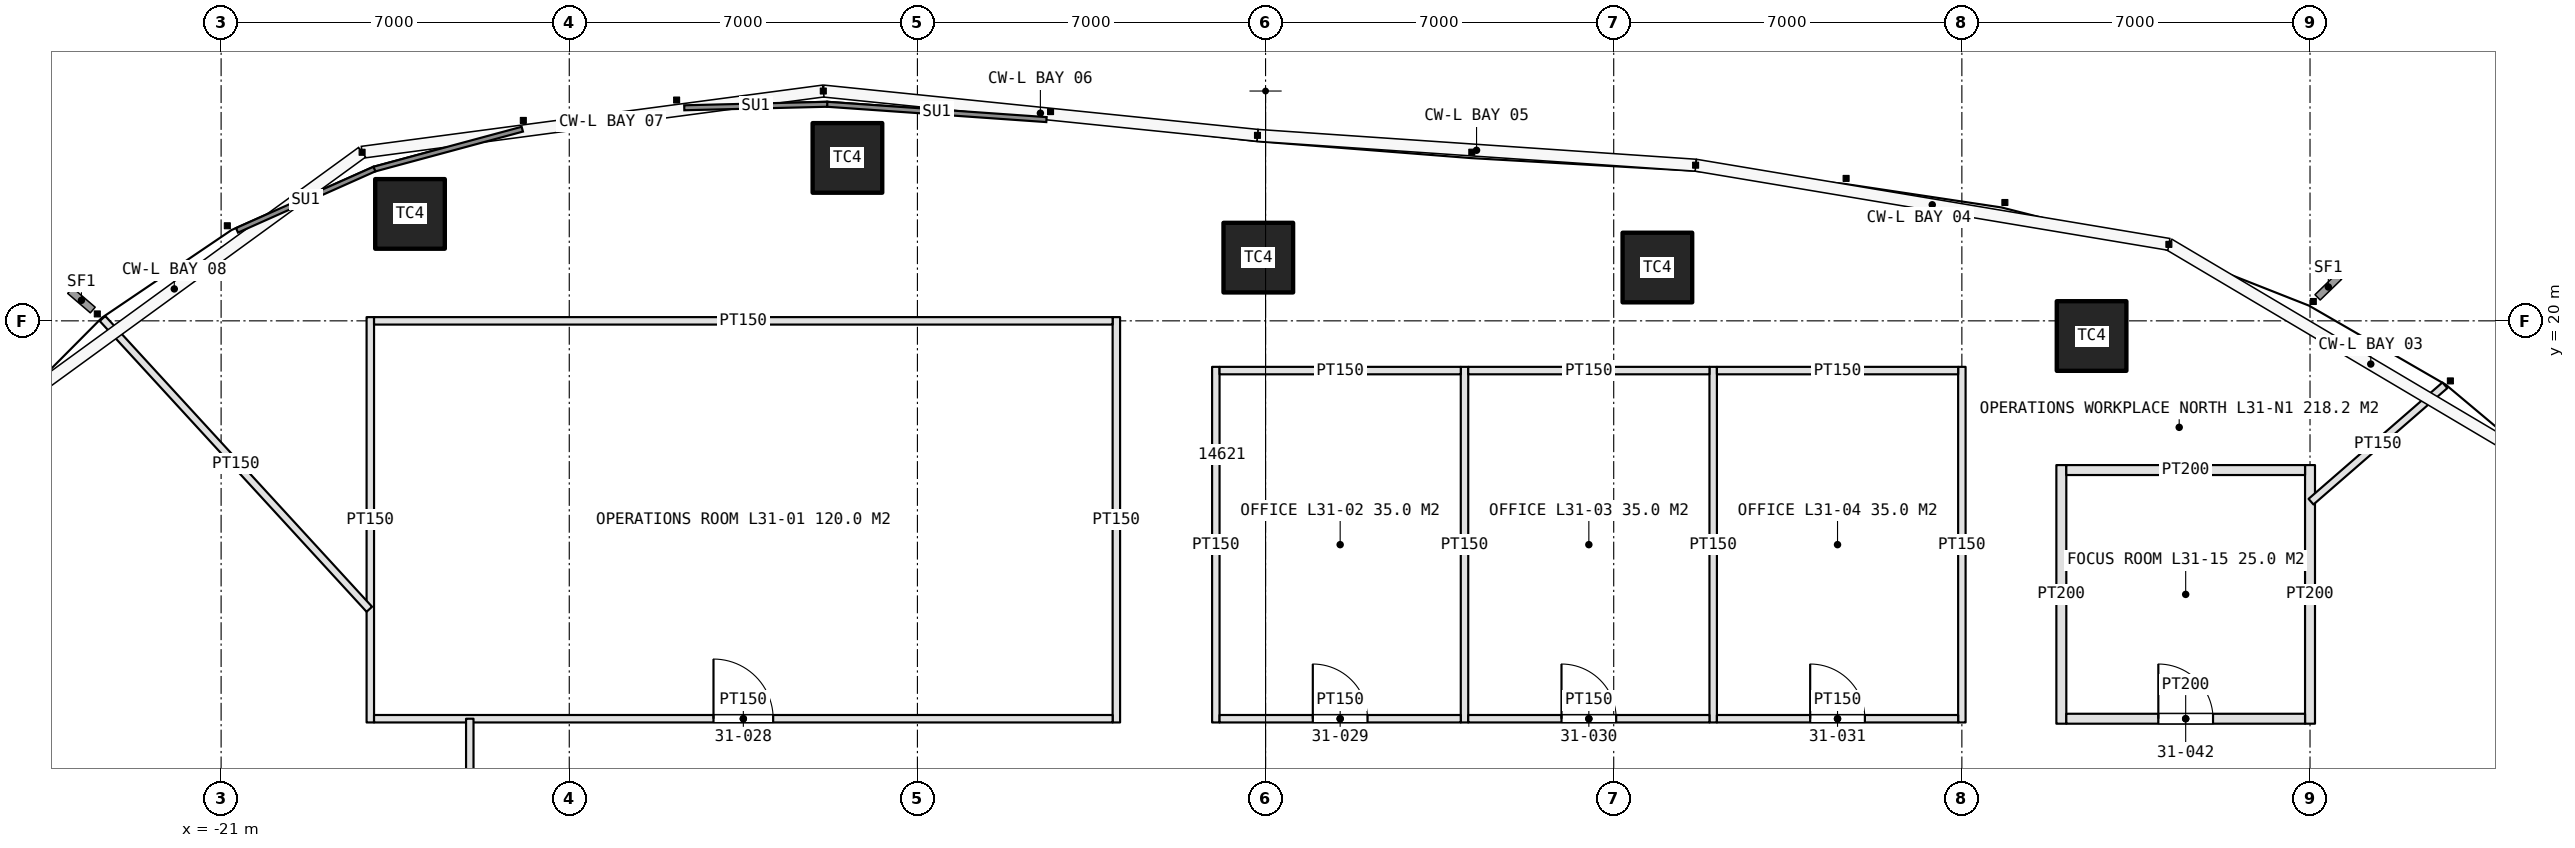
"""IFC4 building model, lengths in metres.
Left out: names, types, materials, properties, quantities, classifications, styles, units other than length and angle.
Written with IfcOpenShell. Run it as: python <this file> out.ifc"""

import sys

from ifc_helpers import new_model, si_unit, direction, frame, frame_2d, origin, origin_2d, place, context, subcontext, project, spatial, rectangle, extrude, element, fill, save


model = new_model("IFC4")
c1 = context("Model", 3, precision=1e-05, world=origin(), true_north=direction((0.0, 1.0)))
c2 = subcontext(c1, "Body", "Model", "MODEL_VIEW")
j1 = project(units=[si_unit("LENGTHUNIT", "METRE"), si_unit("PLANEANGLEUNIT", "RADIAN")], contexts=[c1])
p1 = place(None, origin())
s1 = spatial("IfcSite", under=j1, at=p1, CompositionType="ELEMENT")
p2 = place(p1, origin())
s2 = spatial("IfcBuilding", under=s1, at=p2, CompositionType="ELEMENT")
p3 = place(p2, frame((0.0, 0.0, 147.0)))
s3 = spatial("IfcBuildingStorey", under=s2, at=p3, CompositionType="ELEMENT", Elevation=147.0)
for number, where, z_axis, x_axis in (
    (1, (16.608, 19.695, 0.0), (0.0, 0.0, 1.0), (1.0, 0.0, 0.0)),
    (2, (7.878, 21.072, 0.0), (0.0, 0.0, 1.0), (1.0, 0.0, 0.0)),
    (3, (-0.146, 21.271, 0.0), (0.0, 0.0, 1.0), (1.0, 0.0, 0.0)),
    (4, (-8.407, 23.276, 0.0), (0.0, 0.0, 1.0), (1.0, 0.0, 0.0)),
    (5, (-17.202, 22.15, 0.0), (0.0, 0.0, 1.0), (1.0, 0.0, 0.0)),
):
    element("IfcColumn", number, at=place(p3, frame(where, z_axis=z_axis, x_axis=x_axis)), inside=s3, PredefinedType="COLUMN", context=c2, shape_type="SweptSolid", body=[
        extrude(rectangle(XDim=1.4, YDim=1.4, at=origin_2d()), origin(), (0.0, 0.0, 1.0), 4.2),
    ])
for number, where, z_axis, x_axis in (
    (6, (-18.0, 11.925, 0.0), (0.0, 0.0, 1.0), (0.0, 1.0, 0.0)),
    (7, (-3.0, 11.925, 0.0), (0.0, 0.0, 1.0), (0.0, 1.0, 0.0)),
):
    element("IfcWall", number, at=place(p3, frame(where, z_axis=z_axis, x_axis=x_axis)), inside=s3, PredefinedType="PARTITIONING", context=c2, shape_type="SweptSolid", body=[
        extrude(rectangle(XDim=8.15, YDim=0.15, at=frame_2d((4.075, 0.0))), origin(), (0.0, 0.0, 1.0), 3.0),
    ])
p4 = place(p3, frame((-17.925, 12.0, 0.0), z_axis=(0.0, 0.0, 1.0), x_axis=(1.0, 0.0, 0.0)))
e8 = element("IfcWall", 8, at=p4, inside=s3, PredefinedType="PARTITIONING", context=c2, shape_type="SweptSolid", body=[
    extrude(rectangle(XDim=14.85, YDim=0.15, at=frame_2d((7.425, 0.0))), origin(), (0.0, 0.0, 1.0), 3.0),
])
p5 = place(p4, frame((6.825, 0.0, 0.0)))
e9 = element("IfcOpeningElement", 9, at=p5, cuts=e8, PredefinedType="OPENING", context=c2, shape_type="SweptSolid", body=[
    extrude(rectangle(XDim=1.2, YDim=2.4, at=frame_2d((0.6, 1.2))), frame((0.0, 0.085, 0.0), z_axis=(0.0, -1.0, 0.0), x_axis=(1.0, 0.0, 0.0)), (0.0, 0.0, 1.0), 0.17),
])
p6 = place(p3, frame((-17.925, 20.0, 0.0), z_axis=(0.0, 0.0, 1.0), x_axis=(1.0, 0.0, 0.0)))
e10 = element("IfcWall", 10, at=p6, inside=s3, PredefinedType="PARTITIONING", context=c2, shape_type="SweptSolid", body=[
    extrude(rectangle(XDim=14.85, YDim=0.15, at=frame_2d((7.425, 0.0))), origin(), (0.0, 0.0, 1.0), 3.0),
])
for number, where, z_axis, x_axis in (
    (11, (-1.0, 11.925, 0.0), (0.0, 0.0, 1.0), (0.0, 1.0, 0.0)),
    (12, (4.0, 11.925, 0.0), (0.0, 0.0, 1.0), (0.0, 1.0, 0.0)),
    (13, (9.0, 11.925, 0.0), (0.0, 0.0, 1.0), (0.0, 1.0, 0.0)),
    (14, (14.0, 11.925, 0.0), (0.0, 0.0, 1.0), (0.0, 1.0, 0.0)),
):
    element("IfcWall", number, at=place(p3, frame(where, z_axis=z_axis, x_axis=x_axis)), inside=s3, PredefinedType="PARTITIONING", context=c2, shape_type="SweptSolid", body=[
        extrude(rectangle(XDim=7.15, YDim=0.15, at=frame_2d((3.575, 0.0))), origin(), (0.0, 0.0, 1.0), 3.0),
    ])
p7 = place(p3, frame((-0.925, 12.0, 0.0), z_axis=(0.0, 0.0, 1.0), x_axis=(1.0, 0.0, 0.0)))
e15 = element("IfcWall", 15, at=p7, inside=s3, PredefinedType="PARTITIONING", context=c2, shape_type="SweptSolid", body=[
    extrude(rectangle(XDim=4.85, YDim=0.15, at=frame_2d((2.425, 0.0))), origin(), (0.0, 0.0, 1.0), 3.0),
])
p8 = place(p7, frame((1.875, 0.0, 0.0)))
e16 = element("IfcOpeningElement", 16, at=p8, cuts=e15, PredefinedType="OPENING", context=c2, shape_type="SweptSolid", body=[
    extrude(rectangle(XDim=1.1, YDim=2.3, at=frame_2d((0.55, 1.15))), frame((0.0, 0.085, 0.0), z_axis=(0.0, -1.0, 0.0), x_axis=(1.0, 0.0, 0.0)), (0.0, 0.0, 1.0), 0.17),
])
p9 = place(p3, frame((-0.925, 19.0, 0.0), z_axis=(0.0, 0.0, 1.0), x_axis=(1.0, 0.0, 0.0)))
e17 = element("IfcWall", 17, at=p9, inside=s3, PredefinedType="PARTITIONING", context=c2, shape_type="SweptSolid", body=[
    extrude(rectangle(XDim=4.85, YDim=0.15, at=frame_2d((2.425, 0.0))), origin(), (0.0, 0.0, 1.0), 3.0),
])
p10 = place(p3, frame((4.075, 12.0, 0.0), z_axis=(0.0, 0.0, 1.0), x_axis=(1.0, 0.0, 0.0)))
e18 = element("IfcWall", 18, at=p10, inside=s3, PredefinedType="PARTITIONING", context=c2, shape_type="SweptSolid", body=[
    extrude(rectangle(XDim=4.85, YDim=0.15, at=frame_2d((2.425, 0.0))), origin(), (0.0, 0.0, 1.0), 3.0),
])
p11 = place(p10, frame((1.875, 0.0, 0.0)))
e19 = element("IfcOpeningElement", 19, at=p11, cuts=e18, PredefinedType="OPENING", context=c2, shape_type="SweptSolid", body=[
    extrude(rectangle(XDim=1.1, YDim=2.3, at=frame_2d((0.55, 1.15))), frame((0.0, 0.085, 0.0), z_axis=(0.0, -1.0, 0.0), x_axis=(1.0, 0.0, 0.0)), (0.0, 0.0, 1.0), 0.17),
])
p12 = place(p3, frame((4.075, 19.0, 0.0), z_axis=(0.0, 0.0, 1.0), x_axis=(1.0, 0.0, 0.0)))
e20 = element("IfcWall", 20, at=p12, inside=s3, PredefinedType="PARTITIONING", context=c2, shape_type="SweptSolid", body=[
    extrude(rectangle(XDim=4.85, YDim=0.15, at=frame_2d((2.425, 0.0))), origin(), (0.0, 0.0, 1.0), 3.0),
])
p13 = place(p3, frame((9.075, 12.0, 0.0), z_axis=(0.0, 0.0, 1.0), x_axis=(1.0, 0.0, 0.0)))
e21 = element("IfcWall", 21, at=p13, inside=s3, PredefinedType="PARTITIONING", context=c2, shape_type="SweptSolid", body=[
    extrude(rectangle(XDim=4.85, YDim=0.15, at=frame_2d((2.425, 0.0))), origin(), (0.0, 0.0, 1.0), 3.0),
])
p14 = place(p13, frame((1.875, 0.0, 0.0)))
e22 = element("IfcOpeningElement", 22, at=p14, cuts=e21, PredefinedType="OPENING", context=c2, shape_type="SweptSolid", body=[
    extrude(rectangle(XDim=1.1, YDim=2.3, at=frame_2d((0.55, 1.15))), frame((0.0, 0.085, 0.0), z_axis=(0.0, -1.0, 0.0), x_axis=(1.0, 0.0, 0.0)), (0.0, 0.0, 1.0), 0.17),
])
p15 = place(p3, frame((9.075, 19.0, 0.0), z_axis=(0.0, 0.0, 1.0), x_axis=(1.0, 0.0, 0.0)))
e23 = element("IfcWall", 23, at=p15, inside=s3, PredefinedType="PARTITIONING", context=c2, shape_type="SweptSolid", body=[
    extrude(rectangle(XDim=4.85, YDim=0.15, at=frame_2d((2.425, 0.0))), origin(), (0.0, 0.0, 1.0), 3.0),
])
for number, where, z_axis, x_axis in (
    (24, (16.0, 11.9, 0.0), (0.0, 0.0, 1.0), (0.0, 1.0, 0.0)),
    (25, (21.0, 11.9, 0.0), (0.0, 0.0, 1.0), (0.0, 1.0, 0.0)),
):
    element("IfcWall", number, at=place(p3, frame(where, z_axis=z_axis, x_axis=x_axis)), inside=s3, PredefinedType="PARTITIONING", context=c2, shape_type="SweptSolid", body=[
        extrude(rectangle(XDim=5.2, YDim=0.2, at=frame_2d((2.6, 0.0))), origin(), (0.0, 0.0, 1.0), 3.0),
    ])
p16 = place(p3, frame((16.1, 12.0, 0.0), z_axis=(0.0, 0.0, 1.0), x_axis=(1.0, 0.0, 0.0)))
e26 = element("IfcWall", 26, at=p16, inside=s3, PredefinedType="PARTITIONING", context=c2, shape_type="SweptSolid", body=[
    extrude(rectangle(XDim=4.8, YDim=0.2, at=frame_2d((2.4, 0.0))), origin(), (0.0, 0.0, 1.0), 3.0),
])
p17 = place(p16, frame((1.85, 0.0, 0.0)))
e27 = element("IfcOpeningElement", 27, at=p17, cuts=e26, PredefinedType="OPENING", context=c2, shape_type="SweptSolid", body=[
    extrude(rectangle(XDim=1.1, YDim=2.3, at=frame_2d((0.55, 1.15))), frame((0.0, 0.11, 0.0), z_axis=(0.0, -1.0, 0.0), x_axis=(1.0, 0.0, 0.0)), (0.0, 0.0, 1.0), 0.22),
])
p18 = place(p3, frame((16.1, 17.0, 0.0), z_axis=(0.0, 0.0, 1.0), x_axis=(1.0, 0.0, 0.0)))
e28 = element("IfcWall", 28, at=p18, inside=s3, PredefinedType="PARTITIONING", context=c2, shape_type="SweptSolid", body=[
    extrude(rectangle(XDim=4.8, YDim=0.2, at=frame_2d((2.4, 0.0))), origin(), (0.0, 0.0, 1.0), 3.0),
])
p19 = place(p3, frame((-18.02, 14.201, 0.0), z_axis=(0.0, 0.0, 1.0), x_axis=(-0.676162058246, 0.736752923977, 0.0)))
e29 = element("IfcWall", 29, at=p19, inside=s3, PredefinedType="PARTITIONING", context=c2, shape_type="SweptSolid", body=[
    extrude(rectangle(XDim=7.934, YDim=0.15, at=frame_2d((3.967, 0.0))), origin(), (0.0, 0.0, 1.0), 3.0),
])
p20 = place(p3, frame((21.02, 16.364, 0.0), z_axis=(0.0, 0.0, 1.0), x_axis=(0.75467183248, 0.656102450278, 0.0)))
e30 = element("IfcWall", 30, at=p20, inside=s3, PredefinedType="PARTITIONING", context=c2, shape_type="SweptSolid", body=[
    extrude(rectangle(XDim=3.567, YDim=0.15, at=frame_2d((1.783, 0.0))), origin(), (0.0, 0.0, 1.0), 3.0),
])
p21 = place(p3, frame((-16.0, 12.0, 0.0), z_axis=(0.0, 0.0, 1.0), x_axis=(0.0, -1.0, 0.0)))
e31 = element("IfcWall", 31, at=p21, inside=s3, PredefinedType="PARTITIONING", context=c2, shape_type="SweptSolid", body=[
    extrude(rectangle(XDim=6.0, YDim=0.15, at=frame_2d((3.0, 0.0))), origin(), (0.0, 0.0, 1.0), 3.0),
])
p22 = place(p21, frame((3.9, 0.0, 0.0)))
e32 = element("IfcOpeningElement", 32, at=p22, cuts=e31, PredefinedType="OPENING", context=c2, shape_type="SweptSolid", body=[
    extrude(rectangle(XDim=1.6, YDim=2.4, at=frame_2d((0.8, 1.2))), frame((0.0, 0.085, 0.0), z_axis=(0.0, -1.0, 0.0), x_axis=(1.0, 0.0, 0.0)), (0.0, 0.0, 1.0), 0.17),
])
p23 = place(p5, origin())
e33 = element("IfcDoor", 33, at=p23, inside=s3, OperationType="SINGLE_SWING_LEFT", PredefinedType="DOOR", context=c2, shape_type="SweptSolid", body=[
    extrude(rectangle(XDim=1.2, YDim=2.4, at=frame_2d((0.6, 1.2))), frame((0.0, 0.025, 0.0), z_axis=(0.0, -1.0, 0.0), x_axis=(1.0, 0.0, 0.0)), (0.0, 0.0, 1.0), 0.05),
])
fill(e9, e33)
p24 = place(p8, origin())
e34 = element("IfcDoor", 34, at=p24, inside=s3, OperationType="SINGLE_SWING_LEFT", PredefinedType="DOOR", context=c2, shape_type="SweptSolid", body=[
    extrude(rectangle(XDim=1.1, YDim=2.3, at=frame_2d((0.55, 1.15))), frame((0.0, 0.025, 0.0), z_axis=(0.0, -1.0, 0.0), x_axis=(1.0, 0.0, 0.0)), (0.0, 0.0, 1.0), 0.05),
])
fill(e16, e34)
p25 = place(p11, origin())
e35 = element("IfcDoor", 35, at=p25, inside=s3, OperationType="SINGLE_SWING_LEFT", PredefinedType="DOOR", context=c2, shape_type="SweptSolid", body=[
    extrude(rectangle(XDim=1.1, YDim=2.3, at=frame_2d((0.55, 1.15))), frame((0.0, 0.025, 0.0), z_axis=(0.0, -1.0, 0.0), x_axis=(1.0, 0.0, 0.0)), (0.0, 0.0, 1.0), 0.05),
])
fill(e19, e35)
p26 = place(p14, origin())
e36 = element("IfcDoor", 36, at=p26, inside=s3, OperationType="SINGLE_SWING_LEFT", PredefinedType="DOOR", context=c2, shape_type="SweptSolid", body=[
    extrude(rectangle(XDim=1.1, YDim=2.3, at=frame_2d((0.55, 1.15))), frame((0.0, 0.025, 0.0), z_axis=(0.0, -1.0, 0.0), x_axis=(1.0, 0.0, 0.0)), (0.0, 0.0, 1.0), 0.05),
])
fill(e22, e36)
p27 = place(p17, origin())
e37 = element("IfcDoor", 37, at=p27, inside=s3, OperationType="SINGLE_SWING_LEFT", PredefinedType="DOOR", context=c2, shape_type="SweptSolid", body=[
    extrude(rectangle(XDim=1.1, YDim=2.3, at=frame_2d((0.55, 1.15))), frame((0.0, 0.025, 0.0), z_axis=(0.0, -1.0, 0.0), x_axis=(1.0, 0.0, 0.0)), (0.0, 0.0, 1.0), 0.05),
])
fill(e27, e37)
save(model, sys.argv[1])
